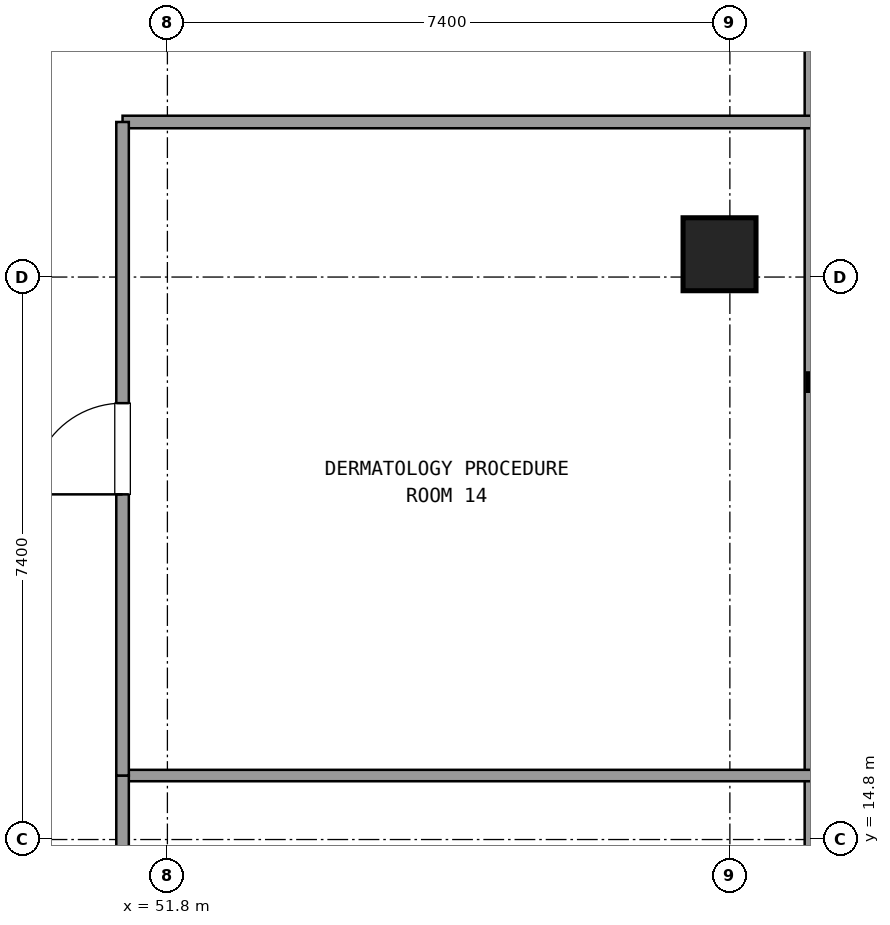
"""IFC4 building model, lengths in metres.
Left out: names, types, materials, properties, quantities, classifications, styles, units other than length and angle.
Written with IfcOpenShell. Run it as: python <this file> out.ifc"""

import sys

from ifc_helpers import new_model, si_unit, direction, frame, frame_2d, origin, origin_2d, place, context, subcontext, project, spatial, rectangle, extrude, element, fill, save


model = new_model("IFC4")
c1 = context("Model", 3, precision=1e-05, world=origin(), true_north=direction((0.0, 1.0)))
c2 = subcontext(c1, "Body", "Model", "MODEL_VIEW")
j1 = project(units=[si_unit("LENGTHUNIT", "METRE"), si_unit("PLANEANGLEUNIT", "RADIAN")], contexts=[c1])
p1 = place(None, origin())
s1 = spatial("IfcSite", under=j1, at=p1, CompositionType="ELEMENT")
p2 = place(p1, origin())
s2 = spatial("IfcBuilding", under=s1, at=p2, CompositionType="ELEMENT")
p3 = place(p2, frame((0.0, 0.0, 149.22)))
s3 = spatial("IfcBuildingStorey", under=s2, at=p3, CompositionType="ELEMENT", Elevation=149.22)
p4 = place(p3, frame((59.064, 22.5, 0.0), z_axis=(0.0, 0.0, 1.0), x_axis=(1.0, 0.0, 0.0)))
e1 = element("IfcColumn", 1, at=p4, inside=s3, PredefinedType="COLUMN", context=c2, shape_type="SweptSolid", body=[
    extrude(rectangle(XDim=0.96, YDim=0.96, at=origin_2d()), origin(), (0.0, 0.0, 1.0), 3.6),
])
p5 = place(p3, frame((60.304, 10.655, 0.0), z_axis=(0.0, 0.0, 1.0), x_axis=(0.0, 1.0, 0.0)))
e2 = element("IfcWall", 2, at=p5, inside=s3, PredefinedType="SOLIDWALL", context=c2, shape_type="SweptSolid", body=[
    extrude(rectangle(XDim=30.49, YDim=0.24, at=frame_2d((15.245, 0.0))), origin(), (0.0, 0.0, 1.0), 0.85),
])
p6 = place(p3, frame((51.21, 24.24, 0.0), z_axis=(0.0, 0.0, 1.0), x_axis=(1.0, 0.0, 0.0)))
e3 = element("IfcWall", 3, at=p6, inside=s3, PredefinedType="PARTITIONING", context=c2, shape_type="SweptSolid", body=[
    extrude(rectangle(XDim=9.074, YDim=0.165, at=frame_2d((4.537, 0.0))), origin(), (0.0, 0.0, 1.0), 2.61),
])
p7 = place(p3, frame((51.21, 15.642, 0.0), z_axis=(0.0, 0.0, 1.0), x_axis=(1.0, 0.0, 0.0)))
e4 = element("IfcWall", 4, at=p7, inside=s3, PredefinedType="PARTITIONING", context=c2, shape_type="SweptSolid", body=[
    extrude(rectangle(XDim=9.074, YDim=0.15, at=frame_2d((4.537, 0.0))), origin(), (0.0, 0.0, 1.0), 2.61),
])
p8 = place(p3, frame((51.21, 4.7, 0.0), z_axis=(0.0, 0.0, 1.0), x_axis=(0.0, 1.0, 0.0)))
e5 = element("IfcWall", 5, at=p8, inside=s3, PredefinedType="PARTITIONING", context=c2, shape_type="SweptSolid", body=[
    extrude(rectangle(XDim=10.942, YDim=0.165, at=frame_2d((5.471, 0.0))), origin(), (0.0, 0.0, 1.0), 2.61),
])
p9 = place(p8, frame((4.871, 0.0, 0.0)))
e6 = element("IfcOpeningElement", 6, at=p9, cuts=e5, PredefinedType="OPENING", context=c2, shape_type="SweptSolid", body=[
    extrude(rectangle(XDim=1.2, YDim=2.15, at=frame_2d((0.6, 1.075))), frame((0.0, 0.093, 0.0), z_axis=(0.0, -1.0, 0.0), x_axis=(1.0, 0.0, 0.0)), (0.0, 0.0, 1.0), 0.185),
])
p10 = place(p3, frame((51.21, 15.642, 0.0), z_axis=(0.0, 0.0, 1.0), x_axis=(0.0, 1.0, 0.0)))
e7 = element("IfcWall", 7, at=p10, inside=s3, PredefinedType="PARTITIONING", context=c2, shape_type="SweptSolid", body=[
    extrude(rectangle(XDim=8.598, YDim=0.165, at=frame_2d((4.299, 0.0))), origin(), (0.0, 0.0, 1.0), 2.61),
])
p11 = place(p10, frame((3.699, 0.0, 0.0)))
e8 = element("IfcOpeningElement", 8, at=p11, cuts=e7, PredefinedType="OPENING", context=c2, shape_type="SweptSolid", body=[
    extrude(rectangle(XDim=1.2, YDim=2.15, at=frame_2d((0.6, 1.075))), frame((0.0, 0.093, 0.0), z_axis=(0.0, -1.0, 0.0), x_axis=(1.0, 0.0, 0.0)), (0.0, 0.0, 1.0), 0.185),
])
p12 = place(p11, origin())
e9 = element("IfcDoor", 9, at=p12, inside=s3, OperationType="SINGLE_SWING_LEFT", PredefinedType="DOOR", context=c2, shape_type="SweptSolid", body=[
    extrude(rectangle(XDim=1.2, YDim=2.15, at=frame_2d((0.6, 1.075))), frame((0.0, 0.025, 0.0), z_axis=(0.0, -1.0, 0.0), x_axis=(1.0, 0.0, 0.0)), (0.0, 0.0, 1.0), 0.05),
])
fill(e8, e9)
save(model, sys.argv[1])
